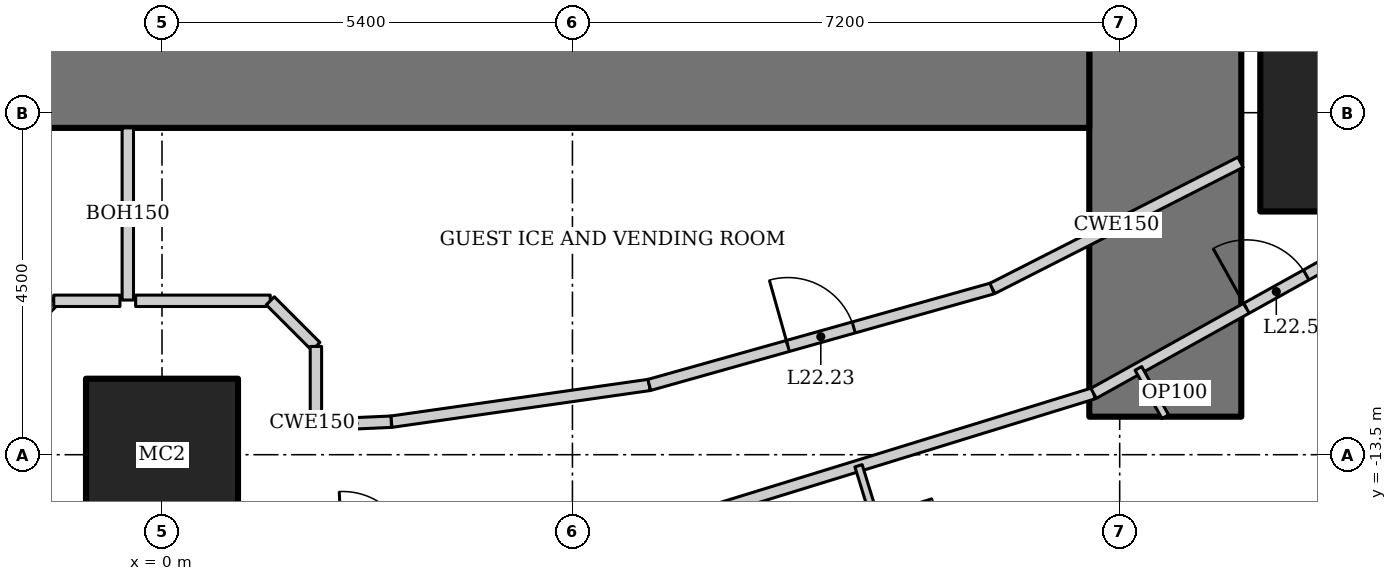
"""IFC4 building model, lengths in metres.
Left out: names, types, materials, properties, quantities, classifications, styles, units other than length and angle.
Written with IfcOpenShell. Run it as: python <this file> out.ifc"""

import sys

from ifc_helpers import new_model, si_unit, direction, frame, frame_2d, origin, origin_2d, place, context, subcontext, project, spatial, rectangle, hollow_rectangle, extrude, element, fill, save


model = new_model("IFC4")
c1 = context("Model", 3, precision=1e-05, world=origin(), true_north=direction((0.0, 1.0)))
c2 = subcontext(c1, "Body", "Model", "MODEL_VIEW")
j1 = project(units=[si_unit("LENGTHUNIT", "METRE"), si_unit("PLANEANGLEUNIT", "RADIAN")], contexts=[c1])
p1 = place(None, origin())
s1 = spatial("IfcSite", under=j1, at=p1, CompositionType="ELEMENT")
p2 = place(p1, origin())
s2 = spatial("IfcBuilding", under=s1, at=p2, CompositionType="ELEMENT")
p3 = place(p2, frame((0.0, 0.0, 94.6)))
s3 = spatial("IfcBuildingStorey", under=s2, at=p3, CompositionType="ELEMENT", Elevation=94.6)
p4 = place(p3, frame((0.0, -13.5, 0.0), z_axis=(0.0, 0.0, 1.0), x_axis=(1.0, 0.0, 0.0)))
e1 = element("IfcColumn", 1, at=p4, inside=s3, PredefinedType="COLUMN", context=c2, shape_type="SweptSolid", body=[
    extrude(hollow_rectangle(XDim=2.0, YDim=2.0, WallThickness=0.17, at=origin_2d()), origin(), (0.0, 0.0, 1.0), 3.6),
])
p5 = place(p3, frame((15.75, -9.0, 0.0), z_axis=(0.0, 0.0, 1.0), x_axis=(1.0, 0.0, 0.0)))
e2 = element("IfcColumn", 2, at=p5, inside=s3, PredefinedType="COLUMN", context=c2, shape_type="SweptSolid", body=[
    extrude(hollow_rectangle(XDim=2.6, YDim=2.6, WallThickness=0.13, at=origin_2d()), origin(), (0.0, 0.0, 1.0), 3.6),
])
p6 = place(p3, frame((13.2, -13.0, 0.0), z_axis=(0.0, 0.0, 1.0), x_axis=(0.0, 1.0, 0.0)))
e3 = element("IfcWall", 3, at=p6, inside=s3, PredefinedType="SHEAR", context=c2, shape_type="SweptSolid", body=[
    extrude(rectangle(XDim=26.0, YDim=2.0, at=frame_2d((13.0, 0.0))), origin(), (0.0, 0.0, 1.0), 3.6),
])
p7 = place(p6, frame((12.1, 0.0, 0.0)))
e4 = element("IfcOpeningElement", 4, at=p7, cuts=e3, PredefinedType="OPENING", context=c2, shape_type="SweptSolid", body=[
    extrude(rectangle(XDim=1.8, YDim=2.1, at=frame_2d((0.9, 1.05))), frame((0.0, 1.01, 0.0), z_axis=(0.0, -1.0, 0.0), x_axis=(1.0, 0.0, 0.0)), (0.0, 0.0, 1.0), 2.02),
])
p8 = place(p3, frame((-12.2, -8.0, 0.0), z_axis=(0.0, 0.0, 1.0), x_axis=(1.0, 0.0, 0.0)))
e5 = element("IfcWall", 5, at=p8, inside=s3, PredefinedType="SHEAR", context=c2, shape_type="SweptSolid", body=[
    extrude(rectangle(XDim=24.4, YDim=2.4, at=frame_2d((12.2, 0.0))), origin(), (0.0, 0.0, 1.0), 3.6),
])
p9 = place(p3, frame((7.253, -14.235, 0.0), z_axis=(0.0, 0.0, 1.0), x_axis=(0.955657956744, 0.294478980085, 0.0)))
e6 = element("IfcWall", 6, at=p9, inside=s3, PredefinedType="PARTITIONING", context=c2, shape_type="SweptSolid", body=[
    extrude(rectangle(XDim=5.236, YDim=0.15, at=frame_2d((2.618, 0.0))), origin(), (0.0, 0.0, 1.0), 3.45),
])
p10 = place(p3, frame((12.257, -12.693, 0.0), z_axis=(0.0, 0.0, 1.0), x_axis=(0.873695910579, 0.486472461541, 0.0)))
e7 = element("IfcWall", 7, at=p10, inside=s3, PredefinedType="PARTITIONING", context=c2, shape_type="SweptSolid", body=[
    extrude(rectangle(XDim=5.771, YDim=0.15, at=frame_2d((2.885, 0.0))), origin(), (0.0, 0.0, 1.0), 3.45),
])
p11 = place(p10, frame((2.301, 0.0, 0.0)))
e8 = element("IfcOpeningElement", 8, at=p11, cuts=e7, PredefinedType="OPENING", context=c2, shape_type="SweptSolid", body=[
    extrude(rectangle(XDim=0.9, YDim=2.1, at=frame_2d((0.45, 1.05))), frame((0.0, 0.085, 0.0), z_axis=(0.0, -1.0, 0.0), x_axis=(1.0, 0.0, 0.0)), (0.0, 0.0, 1.0), 0.17),
])
p12 = place(p3, frame((3.016, -13.066, 0.0), z_axis=(0.0, 0.0, 1.0), x_axis=(0.990002114939, 0.14105251652, 0.0)))
e9 = element("IfcWall", 9, at=p12, inside=s3, PredefinedType="PARTITIONING", context=c2, shape_type="SweptSolid", body=[
    extrude(rectangle(XDim=3.429, YDim=0.15, at=frame_2d((1.714, 0.0))), origin(), (0.0, 0.0, 1.0), 3.45),
])
p13 = place(p3, frame((6.411, -12.582, 0.0), z_axis=(0.0, 0.0, 1.0), x_axis=(0.962643729928, 0.270771211967, 0.0)))
e10 = element("IfcWall", 10, at=p13, inside=s3, PredefinedType="PARTITIONING", context=c2, shape_type="SweptSolid", body=[
    extrude(rectangle(XDim=4.688, YDim=0.15, at=frame_2d((2.344, 0.0))), origin(), (0.0, 0.0, 1.0), 3.45),
])
p14 = place(p13, frame((1.894, 0.0, 0.0)))
e11 = element("IfcOpeningElement", 11, at=p14, cuts=e10, PredefinedType="OPENING", context=c2, shape_type="SweptSolid", body=[
    extrude(rectangle(XDim=0.9, YDim=2.1, at=frame_2d((0.45, 1.05))), frame((0.0, 0.085, 0.0), z_axis=(0.0, -1.0, 0.0), x_axis=(1.0, 0.0, 0.0)), (0.0, 0.0, 1.0), 0.17),
])
p15 = place(p3, frame((9.164, -13.646, 0.0), z_axis=(0.0, 0.0, 1.0), x_axis=(0.294507586191, -0.955649141514, 0.0)))
e12 = element("IfcWall", 12, at=p15, inside=s3, PredefinedType="PARTITIONING", context=c2, shape_type="SweptSolid", body=[
    extrude(rectangle(XDim=2.4, YDim=0.1, at=frame_2d((1.2, 0.0))), origin(), (0.0, 0.0, 1.0), 3.45),
])
p16 = place(p15, frame((0.7, 0.0, 0.0)))
e13 = element("IfcOpeningElement", 13, at=p16, cuts=e12, PredefinedType="OPENING", context=c2, shape_type="SweptSolid", body=[
    extrude(rectangle(XDim=0.8, YDim=2.1, at=frame_2d((0.4, 1.05))), frame((0.0, 0.06, 0.0), z_axis=(0.0, -1.0, 0.0), x_axis=(1.0, 0.0, 0.0)), (0.0, 0.0, 1.0), 0.12),
])
p17 = place(p3, frame((13.2, -13.0, 0.0), z_axis=(0.0, 0.0, 1.0), x_axis=(-0.486383760903, 0.873745293051, 0.0)))
e14 = element("IfcWall", 14, at=p17, inside=s3, PredefinedType="PARTITIONING", context=c2, shape_type="SweptSolid", body=[
    extrude(rectangle(XDim=0.727, YDim=0.1, at=frame_2d((0.364, 0.0))), origin(), (0.0, 0.0, 1.0), 3.45),
])
p18 = place(p3, frame((2.035, -13.109, 0.0), z_axis=(0.0, 0.0, 1.0), x_axis=(0.999010128674, 0.044483286824, 0.0)))
e15 = element("IfcWall", 15, at=p18, inside=s3, PredefinedType="PARTITIONING", context=c2, shape_type="SweptSolid", body=[
    extrude(rectangle(XDim=0.982, YDim=0.15, at=frame_2d((0.491, 0.0))), origin(), (0.0, 0.0, 1.0), 3.45),
])
p19 = place(p3, frame((-0.45, -9.2, 0.0), z_axis=(0.0, 0.0, 1.0), x_axis=(0.0, -1.0, 0.0)))
e16 = element("IfcWall", 16, at=p19, inside=s3, PredefinedType="PARTITIONING", context=c2, shape_type="SweptSolid", body=[
    extrude(rectangle(XDim=2.265, YDim=0.15, at=frame_2d((1.133, 0.0))), origin(), (0.0, 0.0, 1.0), 3.45),
])
p20 = place(p3, frame((-2.025, -12.075, 0.0), z_axis=(0.0, 0.0, 1.0), x_axis=(0.707106781187, 0.707106781187, 0.0)))
e17 = element("IfcWall", 17, at=p20, inside=s3, PredefinedType="PARTITIONING", context=c2, shape_type="SweptSolid", body=[
    extrude(rectangle(XDim=0.849, YDim=0.15, at=frame_2d((0.425, 0.0))), origin(), (0.0, 0.0, 1.0), 3.45),
])
p21 = place(p3, frame((-1.425, -11.475, 0.0), z_axis=(0.0, 0.0, 1.0), x_axis=(1.0, 0.0, 0.0)))
e18 = element("IfcWall", 18, at=p21, inside=s3, PredefinedType="PARTITIONING", context=c2, shape_type="SweptSolid", body=[
    extrude(rectangle(XDim=0.871, YDim=0.15, at=frame_2d((0.436, 0.0))), origin(), (0.0, 0.0, 1.0), 3.45),
])
p22 = place(p3, frame((-0.347, -11.475, 0.0), z_axis=(0.0, 0.0, 1.0), x_axis=(1.0, 0.0, 0.0)))
e19 = element("IfcWall", 19, at=p22, inside=s3, PredefinedType="PARTITIONING", context=c2, shape_type="SweptSolid", body=[
    extrude(rectangle(XDim=1.771, YDim=0.15, at=frame_2d((0.886, 0.0))), origin(), (0.0, 0.0, 1.0), 3.45),
])
p23 = place(p3, frame((1.425, -11.475, 0.0), z_axis=(0.0, 0.0, 1.0), x_axis=(0.707106781187, -0.707106781187, 0.0)))
e20 = element("IfcWall", 20, at=p23, inside=s3, PredefinedType="PARTITIONING", context=c2, shape_type="SweptSolid", body=[
    extrude(rectangle(XDim=0.849, YDim=0.15, at=frame_2d((0.425, 0.0))), origin(), (0.0, 0.0, 1.0), 3.45),
])
p24 = place(p3, frame((2.025, -12.075, 0.0), z_axis=(0.0, 0.0, 1.0), x_axis=(0.0, -1.0, 0.0)))
e21 = element("IfcWall", 21, at=p24, inside=s3, PredefinedType="PARTITIONING", context=c2, shape_type="SweptSolid", body=[
    extrude(rectangle(XDim=0.93, YDim=0.15, at=frame_2d((0.465, 0.0))), origin(), (0.0, 0.0, 1.0), 2.749),
])
p25 = place(p3, frame((10.924, -11.312, 0.0), z_axis=(0.0, 0.0, 1.0), x_axis=(0.891394713219, 0.453227829292, 0.0)))
e22 = element("IfcWall", 22, at=p25, inside=s3, PredefinedType="PARTITIONING", context=c2, shape_type="SweptSolid", body=[
    extrude(rectangle(XDim=3.664, YDim=0.15, at=frame_2d((1.832, 0.0))), origin(), (0.0, 0.0, 1.0), 3.45),
])
p26 = place(p14, origin())
e23 = element("IfcDoor", 23, at=p26, inside=s3, OperationType="SINGLE_SWING_LEFT", PredefinedType="DOOR", context=c2, shape_type="SweptSolid", body=[
    extrude(rectangle(XDim=0.9, YDim=2.1, at=frame_2d((0.45, 1.05))), frame((0.0, 0.025, 0.0), z_axis=(0.0, -1.0, 0.0), x_axis=(1.0, 0.0, 0.0)), (0.0, 0.0, 1.0), 0.05),
])
fill(e11, e23)
p27 = place(p11, origin())
e24 = element("IfcDoor", 24, at=p27, inside=s3, OperationType="SINGLE_SWING_LEFT", PredefinedType="DOOR", context=c2, shape_type="SweptSolid", body=[
    extrude(rectangle(XDim=0.9, YDim=2.1, at=frame_2d((0.45, 1.05))), frame((0.0, 0.025, 0.0), z_axis=(0.0, -1.0, 0.0), x_axis=(1.0, 0.0, 0.0)), (0.0, 0.0, 1.0), 0.05),
])
fill(e8, e24)
save(model, sys.argv[1])
